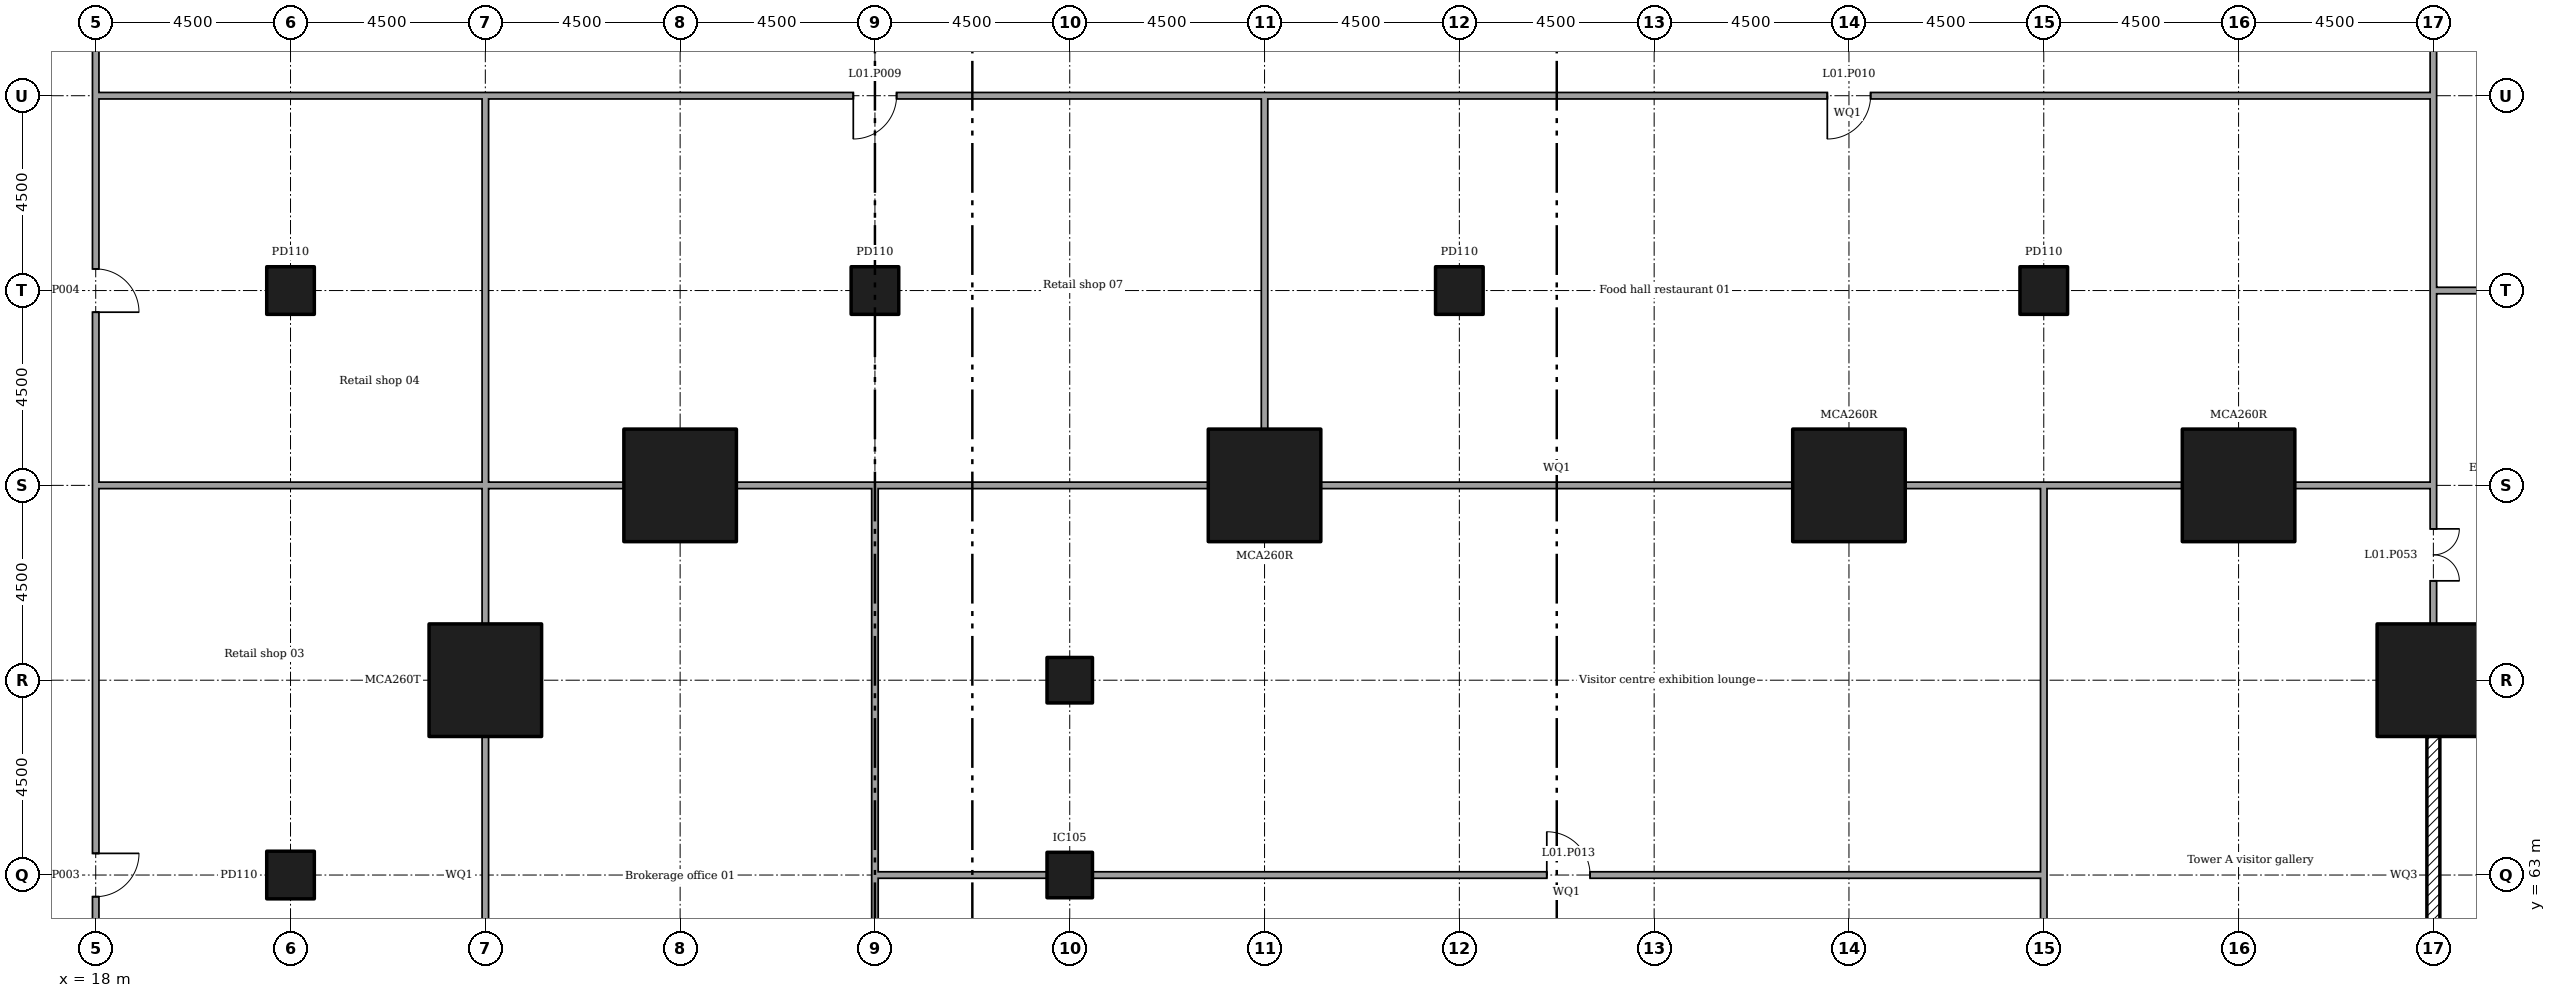
"""IFC4 building model, lengths in metres.
Left out: names, types, materials, properties, quantities, classifications, styles, units other than length and angle.
Written with IfcOpenShell. Run it as: python <this file> out.ifc"""

import sys

from ifc_helpers import new_model, si_unit, direction, frame, frame_2d, origin, origin_2d, place, context, subcontext, project, spatial, rectangle, extrude, element, fill, save


model = new_model("IFC4")
c1 = context("Model", 3, precision=1e-05, world=origin(), true_north=direction((0.0, 1.0)))
c2 = subcontext(c1, "Body", "Model", "MODEL_VIEW")
j1 = project(units=[si_unit("LENGTHUNIT", "METRE"), si_unit("PLANEANGLEUNIT", "RADIAN")], contexts=[c1])
p1 = place(None, origin())
s1 = spatial("IfcSite", under=j1, at=p1, CompositionType="ELEMENT")
p2 = place(p1, origin())
s2 = spatial("IfcBuilding", under=s1, at=p2, CompositionType="ELEMENT")
p3 = place(p2, frame((0.0, 0.0, 6.0)))
s3 = spatial("IfcBuildingStorey", under=s2, at=p3, CompositionType="ELEMENT", Elevation=6.0)
for number, where in (
    (1, (27.0, 67.5, 0.0)),
    (2, (31.5, 72.0, 0.0)),
    (3, (45.0, 72.0, 0.0)),
    (4, (58.5, 72.0, 0.0)),
    (5, (67.5, 72.0, 0.0)),
    (6, (72.0, 67.5, 0.0)),
):
    element("IfcColumn", number, at=place(p3, frame(where)), inside=s3, PredefinedType="COLUMN", context=c2, shape_type="SweptSolid", body=[
        extrude(rectangle(XDim=2.6, YDim=2.6, at=origin_2d()), origin(), (0.0, 0.0, 1.0), 5.5),
    ])
for number, where in (
    (7, (40.5, 63.0, 0.0)),
    (8, (40.5, 67.5, 0.0)),
):
    element("IfcColumn", number, at=place(p3, frame(where)), inside=s3, PredefinedType="COLUMN", context=c2, shape_type="SweptSolid", body=[
        extrude(rectangle(XDim=1.05, YDim=1.05, at=origin_2d()), origin(), (0.0, 0.0, 1.0), 5.5),
    ])
for number, where in (
    (9, (22.5, 63.0, 0.0)),
    (10, (22.5, 76.5, 0.0)),
    (11, (36.0, 76.5, 0.0)),
    (12, (49.5, 76.5, 0.0)),
    (13, (63.0, 76.5, 0.0)),
):
    element("IfcColumn", number, at=place(p3, frame(where)), inside=s3, PredefinedType="COLUMN", context=c2, shape_type="SweptSolid", body=[
        extrude(rectangle(XDim=1.1, YDim=1.1, at=origin_2d()), origin(), (0.0, 0.0, 1.0), 5.5),
    ])
p4 = place(p3, frame((72.0, 59.795, 0.0), z_axis=(0.0, 0.0, 1.0), x_axis=(0.0, 1.0, 0.0)))
e14 = element("IfcWall", 14, at=p4, inside=s3, PredefinedType="SOLIDWALL", context=c2, shape_type="SweptSolid", body=[
    extrude(rectangle(XDim=6.41, YDim=0.3, at=frame_2d((3.205, 0.0))), origin(), (0.0, 0.0, 1.0), 10.05),
])
p5 = place(p3, frame((72.0, 80.925, 0.0), z_axis=(0.0, 0.0, 1.0), x_axis=(0.0, 1.0, 0.0)))
e15 = element("IfcWall", 15, at=p5, inside=s3, PredefinedType="PARTITIONING", context=c2, shape_type="SweptSolid", body=[
    extrude(rectangle(XDim=8.775, YDim=0.15, at=frame_2d((4.387, 0.0))), origin(), (0.0, 0.0, 1.0), 5.05),
])
p6 = place(p5, frame((3.525, 0.0, 0.0)))
e16 = element("IfcOpeningElement", 16, at=p6, cuts=e15, PredefinedType="OPENING", context=c2, shape_type="SweptSolid", body=[
    extrude(rectangle(XDim=1.8, YDim=2.1, at=frame_2d((0.9, 1.05))), frame((0.0, 0.085, 0.0), z_axis=(0.0, -1.0, 0.0), x_axis=(1.0, 0.0, 0.0)), (0.0, 0.0, 1.0), 0.17),
])
p7 = place(p3, frame((72.0, 76.425, 0.0), z_axis=(0.0, 0.0, 1.0), x_axis=(0.0, 1.0, 0.0)))
e17 = element("IfcWall", 17, at=p7, inside=s3, PredefinedType="PARTITIONING", context=c2, shape_type="SweptSolid", body=[
    extrude(rectangle(XDim=4.575, YDim=0.15, at=frame_2d((2.288, 0.0))), origin(), (0.0, 0.0, 1.0), 5.05),
])
p8 = place(p3, frame((72.075, 76.5, 0.0)))
e18 = element("IfcWall", 18, at=p8, inside=s3, PredefinedType="PARTITIONING", context=c2, shape_type="SweptSolid", body=[
    extrude(rectangle(XDim=3.88, YDim=0.15, at=frame_2d((1.94, 0.0))), origin(), (0.0, 0.0, 1.0), 5.05),
])
p9 = place(p8, frame((1.325, 0.0, 0.0)))
e19 = element("IfcOpeningElement", 19, at=p9, cuts=e18, PredefinedType="OPENING", context=c2, shape_type="SweptSolid", body=[
    extrude(rectangle(XDim=1.2, YDim=2.1, at=frame_2d((0.6, 1.05))), frame((0.0, 0.085, 0.0), z_axis=(0.0, -1.0, 0.0), x_axis=(1.0, 0.0, 0.0)), (0.0, 0.0, 1.0), 0.17),
])
p10 = place(p3, frame((18.0, 80.925, 0.0), z_axis=(0.0, 0.0, 1.0), x_axis=(0.0, 1.0, 0.0)))
e20 = element("IfcWall", 20, at=p10, inside=s3, PredefinedType="PARTITIONING", context=c2, shape_type="SweptSolid", body=[
    extrude(rectangle(XDim=8.775, YDim=0.15, at=frame_2d((4.387, 0.0))), origin(), (0.0, 0.0, 1.0), 5.05),
])
p11 = place(p10, frame((3.525, 0.0, 0.0)))
e21 = element("IfcOpeningElement", 21, at=p11, cuts=e20, PredefinedType="OPENING", context=c2, shape_type="SweptSolid", body=[
    extrude(rectangle(XDim=1.8, YDim=2.1, at=frame_2d((0.9, 1.05))), frame((0.0, 0.085, 0.0), z_axis=(0.0, -1.0, 0.0), x_axis=(1.0, 0.0, 0.0)), (0.0, 0.0, 1.0), 0.17),
])
p12 = place(p3, frame((18.0, 54.0, 0.0), z_axis=(0.0, 0.0, 1.0), x_axis=(0.0, 1.0, 0.0)))
e22 = element("IfcWall", 22, at=p12, inside=s3, PredefinedType="PARTITIONING", context=c2, shape_type="SweptSolid", body=[
    extrude(rectangle(XDim=18.075, YDim=0.15, at=frame_2d((9.038, 0.0))), origin(), (0.0, 0.0, 1.0), 5.05),
])
p13 = place(p12, frame((8.5, 0.0, 0.0)))
e23 = element("IfcOpeningElement", 23, at=p13, cuts=e22, PredefinedType="OPENING", context=c2, shape_type="SweptSolid", body=[
    extrude(rectangle(XDim=1.0, YDim=2.1, at=frame_2d((0.5, 1.05))), frame((0.0, 0.085, 0.0), z_axis=(0.0, -1.0, 0.0), x_axis=(1.0, 0.0, 0.0)), (0.0, 0.0, 1.0), 0.17),
])
p14 = place(p3, frame((18.0, 72.0, 0.0), z_axis=(0.0, 0.0, 1.0), x_axis=(0.0, 1.0, 0.0)))
e24 = element("IfcWall", 24, at=p14, inside=s3, PredefinedType="PARTITIONING", context=c2, shape_type="SweptSolid", body=[
    extrude(rectangle(XDim=9.0, YDim=0.15, at=frame_2d((4.5, 0.0))), origin(), (0.0, 0.0, 1.0), 5.05),
])
p15 = place(p14, frame((4.0, 0.0, 0.0)))
e25 = element("IfcOpeningElement", 25, at=p15, cuts=e24, PredefinedType="OPENING", context=c2, shape_type="SweptSolid", body=[
    extrude(rectangle(XDim=1.0, YDim=2.1, at=frame_2d((0.5, 1.05))), frame((0.0, 0.085, 0.0), z_axis=(0.0, -1.0, 0.0), x_axis=(1.0, 0.0, 0.0)), (0.0, 0.0, 1.0), 0.17),
])
p16 = place(p3, frame((18.075, 81.0, 0.0)))
e26 = element("IfcWall", 26, at=p16, inside=s3, PredefinedType="PARTITIONING", context=c2, shape_type="SweptSolid", body=[
    extrude(rectangle(XDim=9.0, YDim=0.15, at=frame_2d((4.5, 0.0))), origin(), (0.0, 0.0, 1.0), 5.05),
])
p17 = place(p3, frame((27.0, 81.0, 0.0)))
e27 = element("IfcWall", 27, at=p17, inside=s3, PredefinedType="PARTITIONING", context=c2, shape_type="SweptSolid", body=[
    extrude(rectangle(XDim=18.075, YDim=0.15, at=frame_2d((9.038, 0.0))), origin(), (0.0, 0.0, 1.0), 5.05),
])
p18 = place(p17, frame((8.5, 0.0, 0.0)))
e28 = element("IfcOpeningElement", 28, at=p18, cuts=e27, PredefinedType="OPENING", context=c2, shape_type="SweptSolid", body=[
    extrude(rectangle(XDim=1.0, YDim=2.1, at=frame_2d((0.5, 1.05))), frame((0.0, 0.085, 0.0), z_axis=(0.0, -1.0, 0.0), x_axis=(1.0, 0.0, 0.0)), (0.0, 0.0, 1.0), 0.17),
])
p19 = place(p3, frame((45.0, 81.0, 0.0)))
e29 = element("IfcWall", 29, at=p19, inside=s3, PredefinedType="PARTITIONING", context=c2, shape_type="SweptSolid", body=[
    extrude(rectangle(XDim=26.925, YDim=0.15, at=frame_2d((13.462, 0.0))), origin(), (0.0, 0.0, 1.0), 5.05),
])
p20 = place(p19, frame((13.0, 0.0, 0.0)))
e30 = element("IfcOpeningElement", 30, at=p20, cuts=e29, PredefinedType="OPENING", context=c2, shape_type="SweptSolid", body=[
    extrude(rectangle(XDim=1.0, YDim=2.1, at=frame_2d((0.5, 1.05))), frame((0.0, 0.085, 0.0), z_axis=(0.0, -1.0, 0.0), x_axis=(1.0, 0.0, 0.0)), (0.0, 0.0, 1.0), 0.17),
])
p21 = place(p3, frame((18.075, 72.0, 0.0)))
e31 = element("IfcWall", 31, at=p21, inside=s3, PredefinedType="PARTITIONING", context=c2, shape_type="SweptSolid", body=[
    extrude(rectangle(XDim=9.0, YDim=0.15, at=frame_2d((4.5, 0.0))), origin(), (0.0, 0.0, 1.0), 5.05),
])
p22 = place(p3, frame((27.0, 59.795, 0.0), z_axis=(0.0, 0.0, 1.0), x_axis=(0.0, 1.0, 0.0)))
e32 = element("IfcWall", 32, at=p22, inside=s3, PredefinedType="PARTITIONING", context=c2, shape_type="SweptSolid", body=[
    extrude(rectangle(XDim=6.41, YDim=0.15, at=frame_2d((3.205, 0.0))), origin(), (0.0, 0.0, 1.0), 5.05),
])
p23 = place(p3, frame((27.0, 68.795, 0.0), z_axis=(0.0, 0.0, 1.0), x_axis=(0.0, 1.0, 0.0)))
e33 = element("IfcWall", 33, at=p23, inside=s3, PredefinedType="PARTITIONING", context=c2, shape_type="SweptSolid", body=[
    extrude(rectangle(XDim=3.13, YDim=0.15, at=frame_2d((1.565, 0.0))), origin(), (0.0, 0.0, 1.0), 5.05),
])
p24 = place(p3, frame((27.0, 71.925, 0.0), z_axis=(0.0, 0.0, 1.0), x_axis=(0.0, 1.0, 0.0)))
e34 = element("IfcWall", 34, at=p24, inside=s3, PredefinedType="PARTITIONING", context=c2, shape_type="SweptSolid", body=[
    extrude(rectangle(XDim=9.0, YDim=0.15, at=frame_2d((4.5, 0.0))), origin(), (0.0, 0.0, 1.0), 5.05),
])
p25 = place(p3, frame((45.0, 73.295, 0.0), z_axis=(0.0, 0.0, 1.0), x_axis=(0.0, 1.0, 0.0)))
e35 = element("IfcWall", 35, at=p25, inside=s3, PredefinedType="PARTITIONING", context=c2, shape_type="SweptSolid", body=[
    extrude(rectangle(XDim=7.63, YDim=0.15, at=frame_2d((3.815, 0.0))), origin(), (0.0, 0.0, 1.0), 5.05),
])
p26 = place(p3, frame((27.075, 72.0, 0.0)))
e36 = element("IfcWall", 36, at=p26, inside=s3, PredefinedType="PARTITIONING", context=c2, shape_type="SweptSolid", body=[
    extrude(rectangle(XDim=3.13, YDim=0.15, at=frame_2d((1.565, 0.0))), origin(), (0.0, 0.0, 1.0), 5.05),
])
p27 = place(p3, frame((32.795, 72.0, 0.0)))
e37 = element("IfcWall", 37, at=p27, inside=s3, PredefinedType="PARTITIONING", context=c2, shape_type="SweptSolid", body=[
    extrude(rectangle(XDim=3.28, YDim=0.15, at=frame_2d((1.64, 0.0))), origin(), (0.0, 0.0, 1.0), 5.05),
])
p28 = place(p3, frame((36.0, 72.0, 0.0)))
e38 = element("IfcWall", 38, at=p28, inside=s3, PredefinedType="PARTITIONING", context=c2, shape_type="SweptSolid", body=[
    extrude(rectangle(XDim=7.705, YDim=0.15, at=frame_2d((3.853, 0.0))), origin(), (0.0, 0.0, 1.0), 5.05),
])
for number, where in (
    (39, (62.925, 72.0, 0.0)),
    (40, (68.795, 72.0, 0.0)),
):
    element("IfcWall", number, at=place(p3, frame(where)), inside=s3, PredefinedType="PARTITIONING", context=c2, shape_type="SweptSolid", body=[
        extrude(rectangle(XDim=3.28, YDim=0.15, at=frame_2d((1.64, 0.0))), origin(), (0.0, 0.0, 1.0), 5.05),
    ])
p29 = place(p3, frame((46.295, 72.0, 0.0)))
e41 = element("IfcWall", 41, at=p29, inside=s3, PredefinedType="PARTITIONING", context=c2, shape_type="SweptSolid", body=[
    extrude(rectangle(XDim=10.91, YDim=0.15, at=frame_2d((5.455, 0.0))), origin(), (0.0, 0.0, 1.0), 5.05),
])
p30 = place(p3, frame((59.795, 72.0, 0.0)))
e42 = element("IfcWall", 42, at=p30, inside=s3, PredefinedType="PARTITIONING", context=c2, shape_type="SweptSolid", body=[
    extrude(rectangle(XDim=3.205, YDim=0.15, at=frame_2d((1.603, 0.0))), origin(), (0.0, 0.0, 1.0), 5.05),
])
p31 = place(p3, frame((72.0, 72.0, 0.0), z_axis=(0.0, 0.0, 1.0), x_axis=(0.0, 1.0, 0.0)))
e43 = element("IfcWall", 43, at=p31, inside=s3, PredefinedType="PARTITIONING", context=c2, shape_type="SweptSolid", body=[
    extrude(rectangle(XDim=4.5, YDim=0.15, at=frame_2d((2.25, 0.0))), origin(), (0.0, 0.0, 1.0), 5.05),
])
p32 = place(p3, frame((63.0, 62.925, 0.0), z_axis=(0.0, 0.0, 1.0), x_axis=(0.0, 1.0, 0.0)))
e44 = element("IfcWall", 44, at=p32, inside=s3, PredefinedType="PARTITIONING", context=c2, shape_type="SweptSolid", body=[
    extrude(rectangle(XDim=9.0, YDim=0.15, at=frame_2d((4.5, 0.0))), origin(), (0.0, 0.0, 1.0), 5.05),
])
p33 = place(p3, frame((63.0, 59.02, 0.0), z_axis=(0.0, 0.0, 1.0), x_axis=(0.0, 1.0, 0.0)))
e45 = element("IfcWall", 45, at=p33, inside=s3, PredefinedType="PARTITIONING", context=c2, shape_type="SweptSolid", body=[
    extrude(rectangle(XDim=3.98, YDim=0.15, at=frame_2d((1.99, 0.0))), origin(), (0.0, 0.0, 1.0), 5.05),
])
p34 = place(p33, frame((1.1, 0.0, 0.0)))
e46 = element("IfcOpeningElement", 46, at=p34, cuts=e45, PredefinedType="OPENING", context=c2, shape_type="SweptSolid", body=[
    extrude(rectangle(XDim=1.8, YDim=2.1, at=frame_2d((0.9, 1.05))), frame((0.0, 0.085, 0.0), z_axis=(0.0, -1.0, 0.0), x_axis=(1.0, 0.0, 0.0)), (0.0, 0.0, 1.0), 0.17),
])
p35 = place(p3, frame((72.0, 68.795, 0.0), z_axis=(0.0, 0.0, 1.0), x_axis=(0.0, 1.0, 0.0)))
e47 = element("IfcWall", 47, at=p35, inside=s3, PredefinedType="PARTITIONING", context=c2, shape_type="SweptSolid", body=[
    extrude(rectangle(XDim=3.13, YDim=0.15, at=frame_2d((1.565, 0.0))), origin(), (0.0, 0.0, 1.0), 5.05),
])
p36 = place(p35, frame((1.0, 0.0, 0.0)))
e48 = element("IfcOpeningElement", 48, at=p36, cuts=e47, PredefinedType="OPENING", context=c2, shape_type="SweptSolid", body=[
    extrude(rectangle(XDim=1.2, YDim=2.1, at=frame_2d((0.6, 1.05))), frame((0.0, 0.085, 0.0), z_axis=(0.0, -1.0, 0.0), x_axis=(1.0, 0.0, 0.0)), (0.0, 0.0, 1.0), 0.17),
])
p37 = place(p3, frame((36.0, 62.925, 0.0), z_axis=(0.0, 0.0, 1.0), x_axis=(0.0, 1.0, 0.0)))
e49 = element("IfcWall", 49, at=p37, inside=s3, PredefinedType="PARTITIONING", context=c2, shape_type="SweptSolid", body=[
    extrude(rectangle(XDim=9.0, YDim=0.15, at=frame_2d((4.5, 0.0))), origin(), (0.0, 0.0, 1.0), 5.05),
])
p38 = place(p3, frame((36.0, 41.02, 0.0), z_axis=(0.0, 0.0, 1.0), x_axis=(0.0, 1.0, 0.0)))
e50 = element("IfcWall", 50, at=p38, inside=s3, PredefinedType="PARTITIONING", context=c2, shape_type="SweptSolid", body=[
    extrude(rectangle(XDim=21.98, YDim=0.15, at=frame_2d((10.99, 0.0))), origin(), (0.0, 0.0, 1.0), 5.05),
])
p39 = place(p38, frame((10.5, 0.0, 0.0)))
e51 = element("IfcOpeningElement", 51, at=p39, cuts=e50, PredefinedType="OPENING", context=c2, shape_type="SweptSolid", body=[
    extrude(rectangle(XDim=1.0, YDim=2.1, at=frame_2d((0.5, 1.05))), frame((0.0, 0.085, 0.0), z_axis=(0.0, -1.0, 0.0), x_axis=(1.0, 0.0, 0.0)), (0.0, 0.0, 1.0), 0.17),
])
p40 = place(p3, frame((36.075, 63.0, 0.0)))
e52 = element("IfcWall", 52, at=p40, inside=s3, PredefinedType="PARTITIONING", context=c2, shape_type="SweptSolid", body=[
    extrude(rectangle(XDim=3.905, YDim=0.15, at=frame_2d((1.953, 0.0))), origin(), (0.0, 0.0, 1.0), 5.05),
])
p41 = place(p3, frame((41.02, 63.0, 0.0)))
e53 = element("IfcWall", 53, at=p41, inside=s3, PredefinedType="PARTITIONING", context=c2, shape_type="SweptSolid", body=[
    extrude(rectangle(XDim=21.905, YDim=0.15, at=frame_2d((10.953, 0.0))), origin(), (0.0, 0.0, 1.0), 5.05),
])
p42 = place(p41, frame((10.5, 0.0, 0.0)))
e54 = element("IfcOpeningElement", 54, at=p42, cuts=e53, PredefinedType="OPENING", context=c2, shape_type="SweptSolid", body=[
    extrude(rectangle(XDim=1.0, YDim=2.1, at=frame_2d((0.5, 1.05))), frame((0.0, 0.085, 0.0), z_axis=(0.0, -1.0, 0.0), x_axis=(1.0, 0.0, 0.0)), (0.0, 0.0, 1.0), 0.17),
])
p43 = place(p13, frame((1.0, 0.0, 0.0), x_axis=(-1.0, 0.0, 0.0)))
e55 = element("IfcDoor", 55, at=p43, inside=s3, OperationType="SINGLE_SWING_RIGHT", PredefinedType="DOOR", context=c2, shape_type="SweptSolid", body=[
    extrude(rectangle(XDim=1.0, YDim=2.1, at=frame_2d((0.5, 1.05))), frame((0.0, 0.025, 0.0), z_axis=(0.0, -1.0, 0.0), x_axis=(1.0, 0.0, 0.0)), (0.0, 0.0, 1.0), 0.05),
])
fill(e23, e55)
p44 = place(p15, frame((1.0, 0.0, 0.0), x_axis=(-1.0, 0.0, 0.0)))
e56 = element("IfcDoor", 56, at=p44, inside=s3, OperationType="SINGLE_SWING_LEFT", PredefinedType="DOOR", context=c2, shape_type="SweptSolid", body=[
    extrude(rectangle(XDim=1.0, YDim=2.1, at=frame_2d((0.5, 1.05))), frame((0.0, 0.025, 0.0), z_axis=(0.0, -1.0, 0.0), x_axis=(1.0, 0.0, 0.0)), (0.0, 0.0, 1.0), 0.05),
])
fill(e25, e56)
p45 = place(p18, frame((1.0, 0.0, 0.0), x_axis=(-1.0, 0.0, 0.0)))
e57 = element("IfcDoor", 57, at=p45, inside=s3, OperationType="SINGLE_SWING_LEFT", PredefinedType="DOOR", context=c2, shape_type="SweptSolid", body=[
    extrude(rectangle(XDim=1.0, YDim=2.1, at=frame_2d((0.5, 1.05))), frame((0.0, 0.025, 0.0), z_axis=(0.0, -1.0, 0.0), x_axis=(1.0, 0.0, 0.0)), (0.0, 0.0, 1.0), 0.05),
])
fill(e28, e57)
p46 = place(p20, frame((1.0, 0.0, 0.0), x_axis=(-1.0, 0.0, 0.0)))
e58 = element("IfcDoor", 58, at=p46, inside=s3, OperationType="SINGLE_SWING_LEFT", PredefinedType="DOOR", context=c2, shape_type="SweptSolid", body=[
    extrude(rectangle(XDim=1.0, YDim=2.1, at=frame_2d((0.5, 1.05))), frame((0.0, 0.025, 0.0), z_axis=(0.0, -1.0, 0.0), x_axis=(1.0, 0.0, 0.0)), (0.0, 0.0, 1.0), 0.05),
])
fill(e30, e58)
p47 = place(p42, origin())
e59 = element("IfcDoor", 59, at=p47, inside=s3, OperationType="SINGLE_SWING_RIGHT", PredefinedType="DOOR", context=c2, shape_type="SweptSolid", body=[
    extrude(rectangle(XDim=1.0, YDim=2.1, at=frame_2d((0.5, 1.05))), frame((0.0, 0.025, 0.0), z_axis=(0.0, -1.0, 0.0), x_axis=(1.0, 0.0, 0.0)), (0.0, 0.0, 1.0), 0.05),
])
fill(e54, e59)
p48 = place(p36, frame((1.2, 0.0, 0.0), x_axis=(-1.0, 0.0, 0.0)))
e60 = element("IfcDoor", 60, at=p48, inside=s3, OperationType="DOUBLE_DOOR_SINGLE_SWING", PredefinedType="DOOR", context=c2, shape_type="SweptSolid", body=[
    extrude(rectangle(XDim=1.2, YDim=2.1, at=frame_2d((0.6, 1.05))), frame((0.0, 0.025, 0.0), z_axis=(0.0, -1.0, 0.0), x_axis=(1.0, 0.0, 0.0)), (0.0, 0.0, 1.0), 0.05),
])
fill(e48, e60)
save(model, sys.argv[1])
